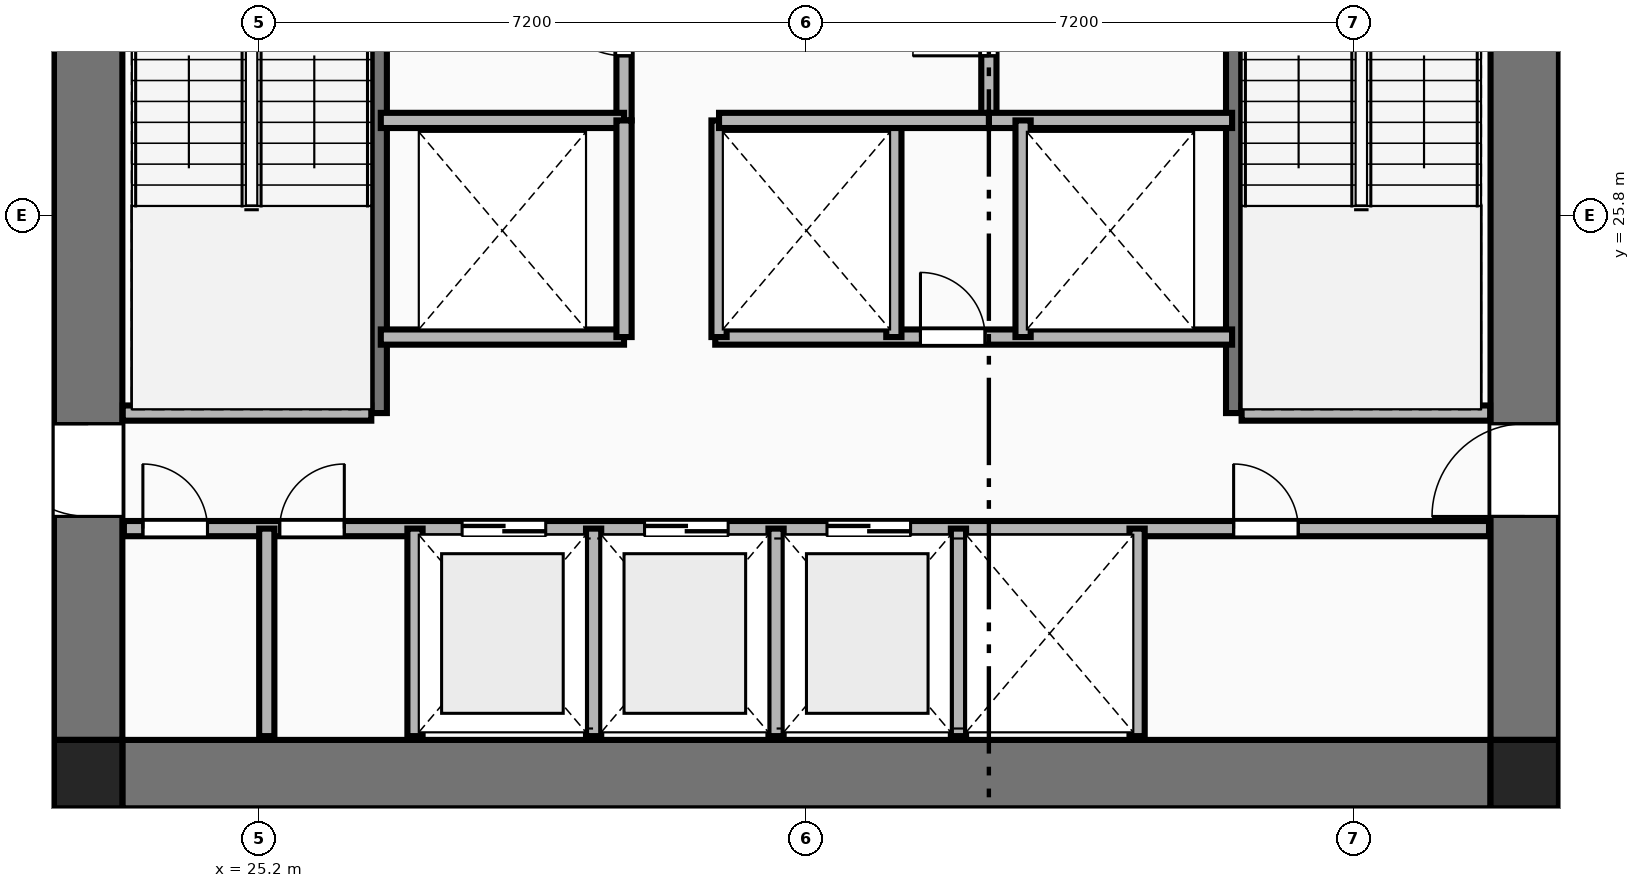
"""IFC4 building model, lengths in metres.
Left out: names, types, materials, properties, quantities, classifications, styles, units other than length and angle.
Written with IfcOpenShell. Run it as: python <this file> out.ifc"""

import sys

from ifc_helpers import new_model, si_unit, direction, frame, frame_2d, origin, origin_2d, place, context, subcontext, project, spatial, rectangle, extrude, element, fill, save


model = new_model("IFC4")
c1 = context("Model", 3, precision=1e-05, world=origin(), true_north=direction((0.0, 1.0)))
c2 = subcontext(c1, "Body", "Model", "MODEL_VIEW")
j1 = project(units=[si_unit("LENGTHUNIT", "METRE"), si_unit("PLANEANGLEUNIT", "RADIAN")], contexts=[c1])
p1 = place(None, origin())
s1 = spatial("IfcSite", under=j1, at=p1, CompositionType="ELEMENT")
p2 = place(p1, origin())
s2 = spatial("IfcBuilding", under=s1, at=p2, CompositionType="ELEMENT")
p3 = place(p2, frame((0.0, 0.0, 53.3)))
s3 = spatial("IfcBuildingStorey", under=s2, at=p3, CompositionType="ELEMENT", Elevation=53.3)
for number, where, z_axis, x_axis in (
    (1, (22.95, 18.45, 0.0), (0.0, 0.0, 1.0), (1.0, 0.0, 0.0)),
    (2, (41.85, 18.45, 0.0), (0.0, 0.0, 1.0), (1.0, 0.0, 0.0)),
):
    element("IfcColumn", number, at=place(p3, frame(where, z_axis=z_axis, x_axis=x_axis)), inside=s3, PredefinedType="COLUMN", context=c2, shape_type="SweptSolid", body=[
        extrude(rectangle(XDim=0.9, YDim=0.9, at=origin_2d()), origin(), (0.0, 0.0, 1.0), 3.55),
    ])
p4 = place(p3, frame((23.4, 18.45, 0.0), z_axis=(0.0, 0.0, 1.0), x_axis=(1.0, 0.0, 0.0)))
e3 = element("IfcWall", 3, at=p4, inside=s3, PredefinedType="SHEAR", context=c2, shape_type="SweptSolid", body=[
    extrude(rectangle(XDim=18.0, YDim=0.9, at=frame_2d((9.0, 0.0))), origin(), (0.0, 0.0, 1.0), 3.33),
])
p5 = place(p3, frame((22.95, 18.9, 0.0), z_axis=(0.0, 0.0, 1.0), x_axis=(0.0, 1.0, 0.0)))
e4 = element("IfcWall", 4, at=p5, inside=s3, PredefinedType="SHEAR", context=c2, shape_type="SweptSolid", body=[
    extrude(rectangle(XDim=14.0, YDim=0.9, at=frame_2d((7.0, 0.0))), origin(), (0.0, 0.0, 1.0), 3.33),
])
p6 = place(p5, frame((2.94, 0.0, 0.0)))
e5 = element("IfcOpeningElement", 5, at=p6, cuts=e4, PredefinedType="OPENING", context=c2, shape_type="SweptSolid", body=[
    extrude(rectangle(XDim=1.22, YDim=2.25, at=frame_2d((0.61, 1.125))), frame((0.0, 0.46, 0.0), z_axis=(0.0, -1.0, 0.0), x_axis=(1.0, 0.0, 0.0)), (0.0, 0.0, 1.0), 0.92),
])
p7 = place(p3, frame((41.85, 18.9, 0.0), z_axis=(0.0, 0.0, 1.0), x_axis=(0.0, 1.0, 0.0)))
e6 = element("IfcWall", 6, at=p7, inside=s3, PredefinedType="SHEAR", context=c2, shape_type="SweptSolid", body=[
    extrude(rectangle(XDim=14.0, YDim=0.9, at=frame_2d((7.0, 0.0))), origin(), (0.0, 0.0, 1.0), 3.33),
])
p8 = place(p7, frame((2.94, 0.0, 0.0)))
e7 = element("IfcOpeningElement", 7, at=p8, cuts=e6, PredefinedType="OPENING", context=c2, shape_type="SweptSolid", body=[
    extrude(rectangle(XDim=1.22, YDim=2.25, at=frame_2d((0.61, 1.125))), frame((0.0, 0.46, 0.0), z_axis=(0.0, -1.0, 0.0), x_axis=(1.0, 0.0, 0.0)), (0.0, 0.0, 1.0), 0.92),
])
p9 = place(p3, frame((26.78, 23.2, 0.0), z_axis=(0.0, 0.0, 1.0), x_axis=(0.0, 1.0, 0.0)))
e8 = element("IfcWall", 8, at=p9, inside=s3, PredefinedType="SHEAR", context=c2, shape_type="SweptSolid", body=[
    extrude(rectangle(XDim=6.78, YDim=0.2, at=frame_2d((3.39, 0.0))), origin(), (0.0, 0.0, 1.0), 3.55),
])
p10 = place(p9, frame((5.32, 0.0, 0.0)))
e9 = element("IfcOpeningElement", 9, at=p10, cuts=e8, PredefinedType="OPENING", context=c2, shape_type="SweptSolid", body=[
    extrude(rectangle(XDim=1.05, YDim=2.15, at=frame_2d((0.525, 1.075))), frame((0.0, 0.11, 0.0), z_axis=(0.0, -1.0, 0.0), x_axis=(1.0, 0.0, 0.0)), (0.0, 0.0, 1.0), 0.22),
])
p11 = place(p3, frame((23.405, 23.2, 0.0), z_axis=(0.0, 0.0, 1.0), x_axis=(1.0, 0.0, 0.0)))
e10 = element("IfcWall", 10, at=p11, inside=s3, PredefinedType="PLUMBINGWALL", context=c2, shape_type="SweptSolid", body=[
    extrude(rectangle(XDim=3.27, YDim=0.2, at=frame_2d((1.635, 0.0))), origin(), (0.0, 0.0, 1.0), 3.33),
])
p12 = place(p3, frame((38.02, 23.2, 0.0), z_axis=(0.0, 0.0, 1.0), x_axis=(0.0, 1.0, 0.0)))
e11 = element("IfcWall", 11, at=p12, inside=s3, PredefinedType="SHEAR", context=c2, shape_type="SweptSolid", body=[
    extrude(rectangle(XDim=6.78, YDim=0.2, at=frame_2d((3.39, 0.0))), origin(), (0.0, 0.0, 1.0), 3.55),
])
p13 = place(p12, frame((5.32, 0.0, 0.0)))
e12 = element("IfcOpeningElement", 12, at=p13, cuts=e11, PredefinedType="OPENING", context=c2, shape_type="SweptSolid", body=[
    extrude(rectangle(XDim=1.05, YDim=2.15, at=frame_2d((0.525, 1.075))), frame((0.0, 0.11, 0.0), z_axis=(0.0, -1.0, 0.0), x_axis=(1.0, 0.0, 0.0)), (0.0, 0.0, 1.0), 0.22),
])
p14 = place(p3, frame((38.125, 23.2, 0.0), z_axis=(0.0, 0.0, 1.0), x_axis=(1.0, 0.0, 0.0)))
e13 = element("IfcWall", 13, at=p14, inside=s3, PredefinedType="PLUMBINGWALL", context=c2, shape_type="SweptSolid", body=[
    extrude(rectangle(XDim=3.27, YDim=0.2, at=frame_2d((1.635, 0.0))), origin(), (0.0, 0.0, 1.0), 3.33),
])
p15 = place(p3, frame((30.0, 27.05, 0.0), z_axis=(0.0, 0.0, 1.0), x_axis=(0.0, 1.0, 0.0)))
e14 = element("IfcWall", 14, at=p15, inside=s3, PredefinedType="PLUMBINGWALL", context=c2, shape_type="SweptSolid", body=[
    extrude(rectangle(XDim=2.75, YDim=0.2, at=frame_2d((1.375, 0.0))), origin(), (0.0, 0.0, 1.0), 3.33),
])
p16 = place(p15, frame((0.85, 0.0, 0.0)))
e15 = element("IfcOpeningElement", 15, at=p16, cuts=e14, PredefinedType="OPENING", context=c2, shape_type="SweptSolid", body=[
    extrude(rectangle(XDim=1.0, YDim=2.15, at=frame_2d((0.5, 1.075))), frame((0.0, 0.11, 0.0), z_axis=(0.0, -1.0, 0.0), x_axis=(1.0, 0.0, 0.0)), (0.0, 0.0, 1.0), 0.22),
])
p17 = place(p3, frame((26.8, 27.05, 0.0), z_axis=(0.0, 0.0, 1.0), x_axis=(1.0, 0.0, 0.0)))
e16 = element("IfcWall", 16, at=p17, inside=s3, PredefinedType="PLUMBINGWALL", context=c2, shape_type="SweptSolid", body=[
    extrude(rectangle(XDim=3.2, YDim=0.2, at=frame_2d((1.6, 0.0))), origin(), (0.0, 0.0, 1.0), 3.33),
])
p18 = place(p3, frame((34.8, 27.05, 0.0), z_axis=(0.0, 0.0, 1.0), x_axis=(0.0, 1.0, 0.0)))
e17 = element("IfcWall", 17, at=p18, inside=s3, PredefinedType="PLUMBINGWALL", context=c2, shape_type="SweptSolid", body=[
    extrude(rectangle(XDim=2.75, YDim=0.2, at=frame_2d((1.375, 0.0))), origin(), (0.0, 0.0, 1.0), 3.33),
])
p19 = place(p18, frame((0.85, 0.0, 0.0)))
e18 = element("IfcOpeningElement", 18, at=p19, cuts=e17, PredefinedType="OPENING", context=c2, shape_type="SweptSolid", body=[
    extrude(rectangle(XDim=1.0, YDim=2.15, at=frame_2d((0.5, 1.075))), frame((0.0, 0.11, 0.0), z_axis=(0.0, -1.0, 0.0), x_axis=(1.0, 0.0, 0.0)), (0.0, 0.0, 1.0), 0.22),
])
for number, where, z_axis, x_axis in (
    (19, (34.8, 27.05, 0.0), (0.0, 0.0, 1.0), (1.0, 0.0, 0.0)),
    (20, (26.8, 24.2, 0.0), (0.0, 0.0, 1.0), (1.0, 0.0, 0.0)),
):
    element("IfcWall", number, at=place(p3, frame(where, z_axis=z_axis, x_axis=x_axis)), inside=s3, PredefinedType="PLUMBINGWALL", context=c2, shape_type="SweptSolid", body=[
        extrude(rectangle(XDim=3.2, YDim=0.2, at=frame_2d((1.6, 0.0))), origin(), (0.0, 0.0, 1.0), 3.33),
    ])
p20 = place(p3, frame((30.0, 24.2, 0.0), z_axis=(0.0, 0.0, 1.0), x_axis=(0.0, 1.0, 0.0)))
e21 = element("IfcWall", 21, at=p20, inside=s3, PredefinedType="PLUMBINGWALL", context=c2, shape_type="SweptSolid", body=[
    extrude(rectangle(XDim=2.85, YDim=0.2, at=frame_2d((1.425, 0.0))), origin(), (0.0, 0.0, 1.0), 3.33),
])
p21 = place(p3, frame((31.2, 24.2, 0.0), z_axis=(0.0, 0.0, 1.0), x_axis=(1.0, 0.0, 0.0)))
e22 = element("IfcWall", 22, at=p21, inside=s3, PredefinedType="PLUMBINGWALL", context=c2, shape_type="SweptSolid", body=[
    extrude(rectangle(XDim=6.8, YDim=0.2, at=frame_2d((3.4, 0.0))), origin(), (0.0, 0.0, 1.0), 3.33),
])
p22 = place(p21, frame((2.7, 0.0, 0.0)))
e23 = element("IfcOpeningElement", 23, at=p22, cuts=e22, PredefinedType="OPENING", context=c2, shape_type="SweptSolid", body=[
    extrude(rectangle(XDim=0.85, YDim=2.05, at=frame_2d((0.425, 1.025))), frame((0.0, 0.11, 0.0), z_axis=(0.0, -1.0, 0.0), x_axis=(1.0, 0.0, 0.0)), (0.0, 0.0, 1.0), 0.22),
])
for number, where, z_axis, x_axis in (
    (24, (31.25, 24.2, 0.0), (0.0, 0.0, 1.0), (0.0, 1.0, 0.0)),
    (25, (33.55, 24.2, 0.0), (0.0, 0.0, 1.0), (0.0, 1.0, 0.0)),
    (26, (35.25, 24.2, 0.0), (0.0, 0.0, 1.0), (0.0, 1.0, 0.0)),
):
    element("IfcWall", number, at=place(p3, frame(where, z_axis=z_axis, x_axis=x_axis)), inside=s3, PredefinedType="PLUMBINGWALL", context=c2, shape_type="SweptSolid", body=[
        extrude(rectangle(XDim=2.85, YDim=0.2, at=frame_2d((1.425, 0.0))), origin(), (0.0, 0.0, 1.0), 3.33),
    ])
p23 = place(p3, frame((31.25, 27.05, 0.0), z_axis=(0.0, 0.0, 1.0), x_axis=(1.0, 0.0, 0.0)))
e27 = element("IfcWall", 27, at=p23, inside=s3, PredefinedType="PLUMBINGWALL", context=c2, shape_type="SweptSolid", body=[
    extrude(rectangle(XDim=3.55, YDim=0.2, at=frame_2d((1.775, 0.0))), origin(), (0.0, 0.0, 1.0), 3.33),
])
p24 = place(p3, frame((23.42, 21.68, 0.0), z_axis=(0.0, 0.0, 1.0), x_axis=(1.0, 0.0, 0.0)))
e28 = element("IfcWall", 28, at=p24, inside=s3, PredefinedType="PLUMBINGWALL", context=c2, shape_type="SweptSolid", body=[
    extrude(rectangle(XDim=17.96, YDim=0.2, at=frame_2d((8.98, 0.0))), origin(), (0.0, 0.0, 1.0), 3.33),
])
p25 = place(p24, frame((4.45, 0.0, 0.0)))
e29 = element("IfcOpeningElement", 29, at=p25, cuts=e28, PredefinedType="OPENING", context=c2, shape_type="SweptSolid", body=[
    extrude(rectangle(XDim=1.1, YDim=2.2, at=frame_2d((0.55, 1.1))), frame((0.0, 0.11, 0.0), z_axis=(0.0, -1.0, 0.0), x_axis=(1.0, 0.0, 0.0)), (0.0, 0.0, 1.0), 0.22),
])
p26 = place(p24, frame((6.85, 0.0, 0.0)))
e30 = element("IfcOpeningElement", 30, at=p26, cuts=e28, PredefinedType="OPENING", context=c2, shape_type="SweptSolid", body=[
    extrude(rectangle(XDim=1.1, YDim=2.2, at=frame_2d((0.55, 1.1))), frame((0.0, 0.11, 0.0), z_axis=(0.0, -1.0, 0.0), x_axis=(1.0, 0.0, 0.0)), (0.0, 0.0, 1.0), 0.22),
])
p27 = place(p24, frame((9.25, 0.0, 0.0)))
e31 = element("IfcOpeningElement", 31, at=p27, cuts=e28, PredefinedType="OPENING", context=c2, shape_type="SweptSolid", body=[
    extrude(rectangle(XDim=1.1, YDim=2.2, at=frame_2d((0.55, 1.1))), frame((0.0, 0.11, 0.0), z_axis=(0.0, -1.0, 0.0), x_axis=(1.0, 0.0, 0.0)), (0.0, 0.0, 1.0), 0.22),
])
p28 = place(p24, frame((0.25, 0.0, 0.0)))
e32 = element("IfcOpeningElement", 32, at=p28, cuts=e28, PredefinedType="OPENING", context=c2, shape_type="SweptSolid", body=[
    extrude(rectangle(XDim=0.85, YDim=2.05, at=frame_2d((0.425, 1.025))), frame((0.0, 0.11, 0.0), z_axis=(0.0, -1.0, 0.0), x_axis=(1.0, 0.0, 0.0)), (0.0, 0.0, 1.0), 0.22),
])
p29 = place(p24, frame((2.05, 0.0, 0.0)))
e33 = element("IfcOpeningElement", 33, at=p29, cuts=e28, PredefinedType="OPENING", context=c2, shape_type="SweptSolid", body=[
    extrude(rectangle(XDim=0.85, YDim=2.05, at=frame_2d((0.425, 1.025))), frame((0.0, 0.11, 0.0), z_axis=(0.0, -1.0, 0.0), x_axis=(1.0, 0.0, 0.0)), (0.0, 0.0, 1.0), 0.22),
])
p30 = place(p24, frame((14.6, 0.0, 0.0)))
e34 = element("IfcOpeningElement", 34, at=p30, cuts=e28, PredefinedType="OPENING", context=c2, shape_type="SweptSolid", body=[
    extrude(rectangle(XDim=0.85, YDim=2.05, at=frame_2d((0.425, 1.025))), frame((0.0, 0.11, 0.0), z_axis=(0.0, -1.0, 0.0), x_axis=(1.0, 0.0, 0.0)), (0.0, 0.0, 1.0), 0.22),
])
for number, where, z_axis, x_axis in (
    (35, (27.25, 18.95, 0.0), (0.0, 0.0, 1.0), (0.0, 1.0, 0.0)),
    (36, (29.6, 18.95, 0.0), (0.0, 0.0, 1.0), (0.0, 1.0, 0.0)),
    (37, (32.0, 18.95, 0.0), (0.0, 0.0, 1.0), (0.0, 1.0, 0.0)),
    (38, (34.4, 18.95, 0.0), (0.0, 0.0, 1.0), (0.0, 1.0, 0.0)),
    (39, (36.75, 18.95, 0.0), (0.0, 0.0, 1.0), (0.0, 1.0, 0.0)),
    (40, (25.3, 18.95, 0.0), (0.0, 0.0, 1.0), (0.0, 1.0, 0.0)),
):
    element("IfcWall", number, at=place(p3, frame(where, z_axis=z_axis, x_axis=x_axis)), inside=s3, PredefinedType="PLUMBINGWALL", context=c2, shape_type="SweptSolid", body=[
        extrude(rectangle(XDim=2.73, YDim=0.2, at=frame_2d((1.365, 0.0))), origin(), (0.0, 0.0, 1.0), 3.33),
    ])
p31 = place(p6, origin())
e41 = element("IfcDoor", 41, at=p31, inside=s3, OperationType="SINGLE_SWING_RIGHT", PredefinedType="DOOR", context=c2, shape_type="SweptSolid", body=[
    extrude(rectangle(XDim=1.22, YDim=2.25, at=frame_2d((0.61, 1.125))), frame((0.0, 0.025, 0.0), z_axis=(0.0, -1.0, 0.0), x_axis=(1.0, 0.0, 0.0)), (0.0, 0.0, 1.0), 0.05),
])
fill(e5, e41)
p32 = place(p8, origin())
e42 = element("IfcDoor", 42, at=p32, inside=s3, OperationType="SINGLE_SWING_LEFT", PredefinedType="DOOR", context=c2, shape_type="SweptSolid", body=[
    extrude(rectangle(XDim=1.22, YDim=2.25, at=frame_2d((0.61, 1.125))), frame((0.0, 0.025, 0.0), z_axis=(0.0, -1.0, 0.0), x_axis=(1.0, 0.0, 0.0)), (0.0, 0.0, 1.0), 0.05),
])
fill(e7, e42)
p33 = place(p16, origin())
e43 = element("IfcDoor", 43, at=p33, inside=s3, OperationType="SINGLE_SWING_RIGHT", PredefinedType="DOOR", context=c2, shape_type="SweptSolid", body=[
    extrude(rectangle(XDim=1.0, YDim=2.15, at=frame_2d((0.5, 1.075))), frame((0.0, 0.025, 0.0), z_axis=(0.0, -1.0, 0.0), x_axis=(1.0, 0.0, 0.0)), (0.0, 0.0, 1.0), 0.05),
])
fill(e15, e43)
p34 = place(p19, origin())
e44 = element("IfcDoor", 44, at=p34, inside=s3, OperationType="SINGLE_SWING_LEFT", PredefinedType="DOOR", context=c2, shape_type="SweptSolid", body=[
    extrude(rectangle(XDim=1.0, YDim=2.15, at=frame_2d((0.5, 1.075))), frame((0.0, 0.025, 0.0), z_axis=(0.0, -1.0, 0.0), x_axis=(1.0, 0.0, 0.0)), (0.0, 0.0, 1.0), 0.05),
])
fill(e18, e44)
p35 = place(p22, origin())
e45 = element("IfcDoor", 45, at=p35, inside=s3, OperationType="SINGLE_SWING_LEFT", PredefinedType="DOOR", context=c2, shape_type="SweptSolid", body=[
    extrude(rectangle(XDim=0.85, YDim=2.05, at=frame_2d((0.425, 1.025))), frame((0.0, 0.025, 0.0), z_axis=(0.0, -1.0, 0.0), x_axis=(1.0, 0.0, 0.0)), (0.0, 0.0, 1.0), 0.05),
])
fill(e23, e45)
p36 = place(p25, origin())
e46 = element("IfcDoor", 46, at=p36, inside=s3, OperationType="DOUBLE_DOOR_SLIDING", PredefinedType="DOOR", context=c2, shape_type="SweptSolid", body=[
    extrude(rectangle(XDim=1.1, YDim=2.2, at=frame_2d((0.55, 1.1))), frame((0.0, 0.025, 0.0), z_axis=(0.0, -1.0, 0.0), x_axis=(1.0, 0.0, 0.0)), (0.0, 0.0, 1.0), 0.05),
])
fill(e29, e46)
p37 = place(p26, origin())
e47 = element("IfcDoor", 47, at=p37, inside=s3, OperationType="DOUBLE_DOOR_SLIDING", PredefinedType="DOOR", context=c2, shape_type="SweptSolid", body=[
    extrude(rectangle(XDim=1.1, YDim=2.2, at=frame_2d((0.55, 1.1))), frame((0.0, 0.025, 0.0), z_axis=(0.0, -1.0, 0.0), x_axis=(1.0, 0.0, 0.0)), (0.0, 0.0, 1.0), 0.05),
])
fill(e30, e47)
p38 = place(p27, origin())
e48 = element("IfcDoor", 48, at=p38, inside=s3, OperationType="DOUBLE_DOOR_SLIDING", PredefinedType="DOOR", context=c2, shape_type="SweptSolid", body=[
    extrude(rectangle(XDim=1.1, YDim=2.2, at=frame_2d((0.55, 1.1))), frame((0.0, 0.025, 0.0), z_axis=(0.0, -1.0, 0.0), x_axis=(1.0, 0.0, 0.0)), (0.0, 0.0, 1.0), 0.05),
])
fill(e31, e48)
p39 = place(p28, origin())
e49 = element("IfcDoor", 49, at=p39, inside=s3, OperationType="SINGLE_SWING_LEFT", PredefinedType="DOOR", context=c2, shape_type="SweptSolid", body=[
    extrude(rectangle(XDim=0.85, YDim=2.05, at=frame_2d((0.425, 1.025))), frame((0.0, 0.025, 0.0), z_axis=(0.0, -1.0, 0.0), x_axis=(1.0, 0.0, 0.0)), (0.0, 0.0, 1.0), 0.05),
])
fill(e32, e49)
p40 = place(p29, origin())
e50 = element("IfcDoor", 50, at=p40, inside=s3, OperationType="SINGLE_SWING_RIGHT", PredefinedType="DOOR", context=c2, shape_type="SweptSolid", body=[
    extrude(rectangle(XDim=0.85, YDim=2.05, at=frame_2d((0.425, 1.025))), frame((0.0, 0.025, 0.0), z_axis=(0.0, -1.0, 0.0), x_axis=(1.0, 0.0, 0.0)), (0.0, 0.0, 1.0), 0.05),
])
fill(e33, e50)
p41 = place(p30, origin())
e51 = element("IfcDoor", 51, at=p41, inside=s3, OperationType="SINGLE_SWING_LEFT", PredefinedType="DOOR", context=c2, shape_type="SweptSolid", body=[
    extrude(rectangle(XDim=0.85, YDim=2.05, at=frame_2d((0.425, 1.025))), frame((0.0, 0.025, 0.0), z_axis=(0.0, -1.0, 0.0), x_axis=(1.0, 0.0, 0.0)), (0.0, 0.0, 1.0), 0.05),
])
fill(e34, e51)
save(model, sys.argv[1])
